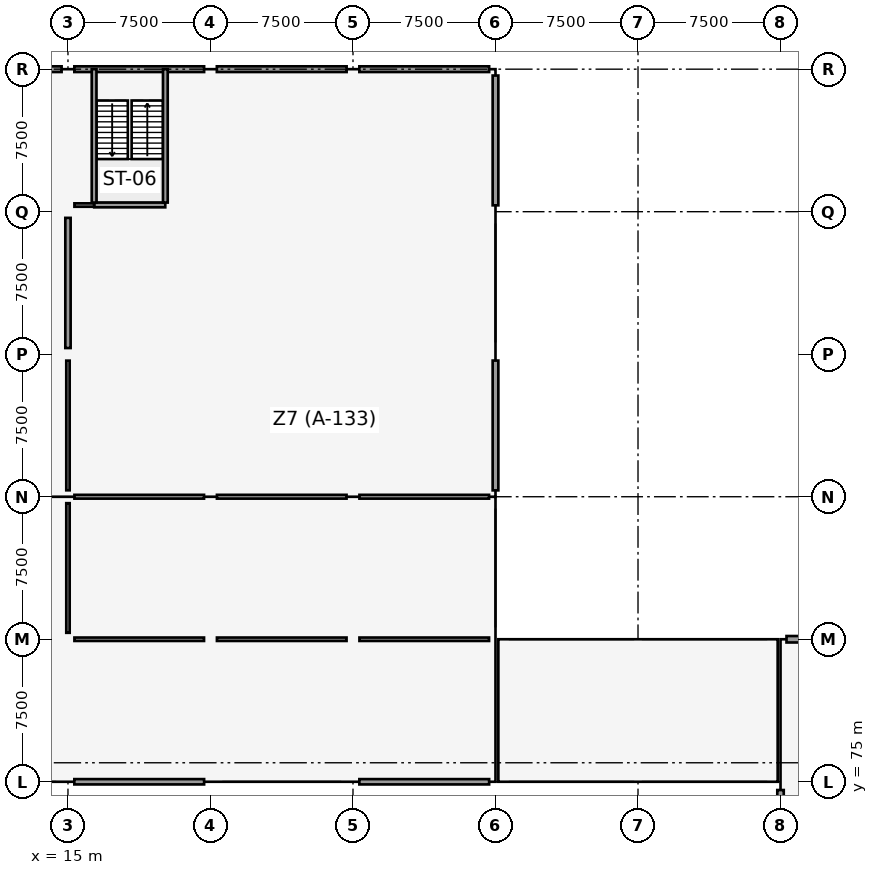
"""IFC4 building model, lengths in metres.
Left out: names, types, materials, properties, quantities, classifications, styles, units other than length and angle.
Written with IfcOpenShell. Run it as: python <this file> out.ifc"""

import sys

from ifc_helpers import new_model, si_unit, direction, frame, frame_2d, origin, origin_2d, place, context, subcontext, project, spatial, rectangle, extrude, element, fill, save


model = new_model("IFC4")
c1 = context("Model", 3, precision=1e-05, world=origin(), true_north=direction((0.0, 1.0)))
c2 = subcontext(c1, "Body", "Model", "MODEL_VIEW")
j1 = project(units=[si_unit("LENGTHUNIT", "METRE"), si_unit("PLANEANGLEUNIT", "RADIAN")], contexts=[c1])
p1 = place(None, origin())
s1 = spatial("IfcSite", under=j1, at=p1, CompositionType="ELEMENT")
p2 = place(p1, origin())
s2 = spatial("IfcBuilding", under=s1, at=p2, CompositionType="ELEMENT")
p3 = place(p2, frame((0.0, 0.0, 4.8)))
s3 = spatial("IfcBuildingStorey", under=s2, at=p3, CompositionType="ELEMENT", Elevation=4.8)
p4 = place(p3, frame((52.5, 75.0, 0.0), z_axis=(0.0, 0.0, 1.0), x_axis=(1.0, 0.0, 0.0)))
e1 = element("IfcColumn", 1, at=p4, inside=s3, PredefinedType="COLUMN", context=c2, shape_type="SweptSolid", body=[
    extrude(rectangle(XDim=0.85, YDim=0.85, at=origin_2d()), origin(), (0.0, 0.0, 1.0), 4.2),
])
p5 = place(p3, frame((52.5, 82.5, 0.0), z_axis=(0.0, 0.0, 1.0), x_axis=(1.0, 0.0, 0.0)))
e2 = element("IfcColumn", 2, at=p5, inside=s3, PredefinedType="COLUMN", context=c2, shape_type="SweptSolid", body=[
    extrude(rectangle(XDim=0.6, YDim=1.1, at=origin_2d()), origin(), (0.0, 0.0, 1.0), 4.2),
])
for number, where, z_axis, x_axis in (
    (3, (15.0, 75.0, 0.0), (0.0, 0.0, 1.0), (1.0, 0.0, 0.0)),
    (4, (15.0, 82.5, 0.0), (0.0, 0.0, 1.0), (1.0, 0.0, 0.0)),
    (5, (15.0, 90.0, 0.0), (0.0, 0.0, 1.0), (1.0, 0.0, 0.0)),
    (6, (15.0, 97.5, 0.0), (0.0, 0.0, 1.0), (1.0, 0.0, 0.0)),
    (7, (15.0, 105.0, 0.0), (0.0, 0.0, 1.0), (1.0, 0.0, 0.0)),
    (8, (15.0, 112.5, 0.0), (0.0, 0.0, 1.0), (1.0, 0.0, 0.0)),
    (9, (22.5, 75.0, 0.0), (0.0, 0.0, 1.0), (1.0, 0.0, 0.0)),
    (10, (22.5, 82.5, 0.0), (0.0, 0.0, 1.0), (1.0, 0.0, 0.0)),
    (11, (22.5, 90.0, 0.0), (0.0, 0.0, 1.0), (1.0, 0.0, 0.0)),
    (12, (22.5, 97.5, 0.0), (0.0, 0.0, 1.0), (1.0, 0.0, 0.0)),
    (13, (22.5, 105.0, 0.0), (0.0, 0.0, 1.0), (1.0, 0.0, 0.0)),
    (14, (22.5, 112.5, 0.0), (0.0, 0.0, 1.0), (1.0, 0.0, 0.0)),
    (15, (30.0, 75.0, 0.0), (0.0, 0.0, 1.0), (1.0, 0.0, 0.0)),
    (16, (30.0, 82.5, 0.0), (0.0, 0.0, 1.0), (1.0, 0.0, 0.0)),
    (17, (30.0, 90.0, 0.0), (0.0, 0.0, 1.0), (1.0, 0.0, 0.0)),
    (18, (30.0, 97.5, 0.0), (0.0, 0.0, 1.0), (1.0, 0.0, 0.0)),
    (19, (30.0, 105.0, 0.0), (0.0, 0.0, 1.0), (1.0, 0.0, 0.0)),
    (20, (30.0, 112.5, 0.0), (0.0, 0.0, 1.0), (1.0, 0.0, 0.0)),
    (21, (37.5, 75.0, 0.0), (0.0, 0.0, 1.0), (1.0, 0.0, 0.0)),
    (22, (37.5, 82.5, 0.0), (0.0, 0.0, 1.0), (1.0, 0.0, 0.0)),
    (23, (37.5, 90.0, 0.0), (0.0, 0.0, 1.0), (1.0, 0.0, 0.0)),
    (24, (37.5, 97.5, 0.0), (0.0, 0.0, 1.0), (1.0, 0.0, 0.0)),
    (25, (37.5, 105.0, 0.0), (0.0, 0.0, 1.0), (1.0, 0.0, 0.0)),
    (26, (37.5, 112.5, 0.0), (0.0, 0.0, 1.0), (1.0, 0.0, 0.0)),
):
    element("IfcColumn", number, at=place(p3, frame(where, z_axis=z_axis, x_axis=x_axis)), inside=s3, PredefinedType="COLUMN", context=c2, shape_type="SweptSolid", body=[
        extrude(rectangle(XDim=0.65, YDim=0.65, at=origin_2d()), origin(), (0.0, 0.0, 1.0), 4.2),
    ])
p6 = place(p3, frame((15.0, 97.825, 0.0), z_axis=(0.0, 0.0, 1.0), x_axis=(0.0, 1.0, 0.0)))
e27 = element("IfcWall", 27, at=p6, inside=s3, PredefinedType="SHEAR", context=c2, shape_type="SweptSolid", body=[
    extrude(rectangle(XDim=6.85, YDim=0.28, at=frame_2d((3.425, 0.0))), origin(), (0.0, 0.0, 1.0), 3.9),
])
p7 = place(p3, frame((52.5, 67.935, 0.0), z_axis=(0.0, 0.0, 1.0), x_axis=(0.0, 1.0, 0.0)))
e28 = element("IfcWall", 28, at=p7, inside=s3, PredefinedType="SOLIDWALL", context=c2, shape_type="SweptSolid", body=[
    extrude(rectangle(XDim=6.63, YDim=0.34, at=frame_2d((3.315, 0.0))), origin(), (0.0, 0.0, 1.0), 2.94),
])
p8 = place(p3, frame((52.815, 82.5, 0.0), z_axis=(0.0, 0.0, 1.0), x_axis=(1.0, 0.0, 0.0)))
e29 = element("IfcWall", 29, at=p8, inside=s3, PredefinedType="SOLIDWALL", context=c2, shape_type="SweptSolid", body=[
    extrude(rectangle(XDim=6.75, YDim=0.34, at=frame_2d((3.375, 0.0))), origin(), (0.0, 0.0, 1.0), 3.14),
])
p9 = place(p8, frame((2.585, 0.0, 0.6)))
e30 = element("IfcOpeningElement", 30, at=p9, cuts=e29, PredefinedType="OPENING", context=c2, shape_type="SweptSolid", body=[
    extrude(rectangle(XDim=1.7, YDim=1.8, at=frame_2d((0.85, 0.9))), frame((0.0, 0.18, 0.0), z_axis=(0.0, -1.0, 0.0), x_axis=(1.0, 0.0, 0.0)), (0.0, 0.0, 1.0), 0.36),
])
p10 = place(p3, frame((8.12, 112.5, 0.0), z_axis=(0.0, 0.0, 1.0), x_axis=(1.0, 0.0, 0.0)))
e31 = element("IfcWall", 31, at=p10, inside=s3, PredefinedType="SOLIDWALL", context=c2, shape_type="SweptSolid", body=[
    extrude(rectangle(XDim=6.545, YDim=0.3, at=frame_2d((3.272, 0.0))), origin(), (0.0, 0.0, 1.0), 2.89),
])
p11 = place(p10, frame((2.355, 0.0, 0.6)))
e32 = element("IfcOpeningElement", 32, at=p11, cuts=e31, PredefinedType="OPENING", context=c2, shape_type="SweptSolid", body=[
    extrude(rectangle(XDim=1.55, YDim=1.8, at=frame_2d((0.775, 0.9))), frame((0.0, 0.16, 0.0), z_axis=(0.0, -1.0, 0.0), x_axis=(1.0, 0.0, 0.0)), (0.0, 0.0, 1.0), 0.32),
])
p12 = place(p3, frame((15.335, 112.5, 0.0), z_axis=(0.0, 0.0, 1.0), x_axis=(1.0, 0.0, 0.0)))
e33 = element("IfcWall", 33, at=p12, inside=s3, PredefinedType="SOLIDWALL", context=c2, shape_type="SweptSolid", body=[
    extrude(rectangle(XDim=6.83, YDim=0.3, at=frame_2d((3.415, 0.0))), origin(), (0.0, 0.0, 1.0), 2.89),
])
p13 = place(p3, frame((15.335, 75.0, 0.0), z_axis=(0.0, 0.0, 1.0), x_axis=(1.0, 0.0, 0.0)))
e34 = element("IfcWall", 34, at=p13, inside=s3, PredefinedType="SOLIDWALL", context=c2, shape_type="SweptSolid", body=[
    extrude(rectangle(XDim=6.83, YDim=0.28, at=frame_2d((3.415, 0.0))), origin(), (0.0, 0.0, 1.0), 2.89),
])
p14 = place(p13, frame((2.415, 0.0, 0.6)))
e35 = element("IfcOpeningElement", 35, at=p14, cuts=e34, PredefinedType="OPENING", context=c2, shape_type="SweptSolid", body=[
    extrude(rectangle(XDim=2.0, YDim=1.45, at=frame_2d((1.0, 0.725))), frame((0.0, 0.15, 0.0), z_axis=(0.0, -1.0, 0.0), x_axis=(1.0, 0.0, 0.0)), (0.0, 0.0, 1.0), 0.3),
])
p15 = place(p3, frame((22.835, 112.5, 0.0), z_axis=(0.0, 0.0, 1.0), x_axis=(1.0, 0.0, 0.0)))
e36 = element("IfcWall", 36, at=p15, inside=s3, PredefinedType="SOLIDWALL", context=c2, shape_type="SweptSolid", body=[
    extrude(rectangle(XDim=6.83, YDim=0.3, at=frame_2d((3.415, 0.0))), origin(), (0.0, 0.0, 1.0), 3.14),
])
p16 = place(p15, frame((2.49, 0.0, 0.6)))
e37 = element("IfcOpeningElement", 37, at=p16, cuts=e36, PredefinedType="OPENING", context=c2, shape_type="SweptSolid", body=[
    extrude(rectangle(XDim=1.85, YDim=1.8, at=frame_2d((0.925, 0.9))), frame((0.0, 0.16, 0.0), z_axis=(0.0, -1.0, 0.0), x_axis=(1.0, 0.0, 0.0)), (0.0, 0.0, 1.0), 0.32),
])
p17 = place(p3, frame((30.335, 112.5, 0.0), z_axis=(0.0, 0.0, 1.0), x_axis=(1.0, 0.0, 0.0)))
e38 = element("IfcWall", 38, at=p17, inside=s3, PredefinedType="SOLIDWALL", context=c2, shape_type="SweptSolid", body=[
    extrude(rectangle(XDim=6.83, YDim=0.3, at=frame_2d((3.415, 0.0))), origin(), (0.0, 0.0, 1.0), 3.14),
])
p18 = place(p17, frame((2.415, 0.0, 0.6)))
e39 = element("IfcOpeningElement", 39, at=p18, cuts=e38, PredefinedType="OPENING", context=c2, shape_type="SweptSolid", body=[
    extrude(rectangle(XDim=2.0, YDim=1.45, at=frame_2d((1.0, 0.725))), frame((0.0, 0.16, 0.0), z_axis=(0.0, -1.0, 0.0), x_axis=(1.0, 0.0, 0.0)), (0.0, 0.0, 1.0), 0.32),
])
p19 = place(p3, frame((30.335, 75.0, 0.0), z_axis=(0.0, 0.0, 1.0), x_axis=(1.0, 0.0, 0.0)))
e40 = element("IfcWall", 40, at=p19, inside=s3, PredefinedType="SOLIDWALL", context=c2, shape_type="SweptSolid", body=[
    extrude(rectangle(XDim=6.83, YDim=0.28, at=frame_2d((3.415, 0.0))), origin(), (0.0, 0.0, 1.0), 3.14),
])
p20 = place(p19, frame((2.84, 0.0, 0.6)))
e41 = element("IfcOpeningElement", 41, at=p20, cuts=e40, PredefinedType="OPENING", context=c2, shape_type="SweptSolid", body=[
    extrude(rectangle(XDim=1.15, YDim=1.3, at=frame_2d((0.575, 0.65))), frame((0.0, 0.15, 0.0), z_axis=(0.0, -1.0, 0.0), x_axis=(1.0, 0.0, 0.0)), (0.0, 0.0, 1.0), 0.3),
])
p21 = place(p3, frame((37.5, 90.335, 0.0), z_axis=(0.0, 0.0, 1.0), x_axis=(0.0, 1.0, 0.0)))
e42 = element("IfcWall", 42, at=p21, inside=s3, PredefinedType="SOLIDWALL", context=c2, shape_type="SweptSolid", body=[
    extrude(rectangle(XDim=6.83, YDim=0.3, at=frame_2d((3.415, 0.0))), origin(), (0.0, 0.0, 1.0), 2.84),
])
p22 = place(p21, frame((2.815, 0.0, 0.6)))
e43 = element("IfcOpeningElement", 43, at=p22, cuts=e42, PredefinedType="OPENING", context=c2, shape_type="SweptSolid", body=[
    extrude(rectangle(XDim=1.2, YDim=1.2, at=frame_2d((0.6, 0.6))), frame((0.0, 0.16, 0.0), z_axis=(0.0, -1.0, 0.0), x_axis=(1.0, 0.0, 0.0)), (0.0, 0.0, 1.0), 0.32),
])
p23 = place(p3, frame((37.5, 105.335, 0.0), z_axis=(0.0, 0.0, 1.0), x_axis=(0.0, 1.0, 0.0)))
e44 = element("IfcWall", 44, at=p23, inside=s3, PredefinedType="SOLIDWALL", context=c2, shape_type="SweptSolid", body=[
    extrude(rectangle(XDim=6.83, YDim=0.3, at=frame_2d((3.415, 0.0))), origin(), (0.0, 0.0, 1.0), 2.94),
])
p24 = place(p23, frame((2.515, 0.0, 0.6)))
e45 = element("IfcOpeningElement", 45, at=p24, cuts=e44, PredefinedType="OPENING", context=c2, shape_type="SweptSolid", body=[
    extrude(rectangle(XDim=1.8, YDim=1.2, at=frame_2d((0.9, 0.6))), frame((0.0, 0.16, 0.0), z_axis=(0.0, -1.0, 0.0), x_axis=(1.0, 0.0, 0.0)), (0.0, 0.0, 1.0), 0.32),
])
p25 = place(p3, frame((16.38, 105.355, 0.0), z_axis=(0.0, 0.0, 1.0), x_axis=(1.0, 0.0, 0.0)))
e46 = element("IfcWall", 46, at=p25, inside=s3, PredefinedType="SOLIDWALL", context=c2, shape_type="SweptSolid", body=[
    extrude(rectangle(XDim=3.74, YDim=0.25, at=frame_2d((1.87, 0.0))), origin(), (0.0, 0.0, 1.0), 3.92),
])
p26 = place(p3, frame((16.375, 105.48, 0.0), z_axis=(0.0, 0.0, 1.0), x_axis=(0.0, 1.0, 0.0)))
e47 = element("IfcWall", 47, at=p26, inside=s3, PredefinedType="SOLIDWALL", context=c2, shape_type="SweptSolid", body=[
    extrude(rectangle(XDim=7.02, YDim=0.25, at=frame_2d((3.51, 0.0))), origin(), (0.0, 0.0, 1.0), 3.92),
])
p27 = place(p26, frame((5.47, 0.0, 0.0)))
e48 = element("IfcOpeningElement", 48, at=p27, cuts=e47, PredefinedType="OPENING", context=c2, shape_type="SweptSolid", body=[
    extrude(rectangle(XDim=1.1, YDim=2.15, at=frame_2d((0.55, 1.075))), frame((0.0, 0.135, 0.0), z_axis=(0.0, -1.0, 0.0), x_axis=(1.0, 0.0, 0.0)), (0.0, 0.0, 1.0), 0.27),
])
p28 = place(p3, frame((20.125, 105.48, 0.0), z_axis=(0.0, 0.0, 1.0), x_axis=(0.0, 1.0, 0.0)))
e49 = element("IfcWall", 49, at=p28, inside=s3, PredefinedType="SOLIDWALL", context=c2, shape_type="SweptSolid", body=[
    extrude(rectangle(XDim=7.02, YDim=0.25, at=frame_2d((3.51, 0.0))), origin(), (0.0, 0.0, 1.0), 3.92),
])
p29 = place(p3, frame((15.339, 105.35, 0.0), z_axis=(0.0, 0.0, 1.0), x_axis=(1.0, 0.0, 0.0)))
e50 = element("IfcWall", 50, at=p29, inside=s3, PredefinedType="PARTITIONING", context=c2, shape_type="SweptSolid", body=[
    extrude(rectangle(XDim=1.041, YDim=0.18, at=frame_2d((0.521, 0.0))), origin(), (0.0, 0.0, 1.0), 2.89),
])
p30 = place(p3, frame((15.339, 82.5, 0.0), z_axis=(0.0, 0.0, 1.0), x_axis=(1.0, 0.0, 0.0)))
e51 = element("IfcWall", 51, at=p30, inside=s3, PredefinedType="PARTITIONING", context=c2, shape_type="SweptSolid", body=[
    extrude(rectangle(XDim=6.822, YDim=0.18, at=frame_2d((3.411, 0.0))), origin(), (0.0, 0.0, 1.0), 2.84),
])
p31 = place(p3, frame((22.839, 82.5, 0.0), z_axis=(0.0, 0.0, 1.0), x_axis=(1.0, 0.0, 0.0)))
e52 = element("IfcWall", 52, at=p31, inside=s3, PredefinedType="PARTITIONING", context=c2, shape_type="SweptSolid", body=[
    extrude(rectangle(XDim=6.822, YDim=0.18, at=frame_2d((3.411, 0.0))), origin(), (0.0, 0.0, 1.0), 2.84),
])
p32 = place(p31, frame((2.886, 0.0, 0.0)))
e53 = element("IfcOpeningElement", 53, at=p32, cuts=e52, PredefinedType="OPENING", context=c2, shape_type="SweptSolid", body=[
    extrude(rectangle(XDim=1.05, YDim=2.12, at=frame_2d((0.525, 1.06))), frame((0.0, 0.1, 0.0), z_axis=(0.0, -1.0, 0.0), x_axis=(1.0, 0.0, 0.0)), (0.0, 0.0, 1.0), 0.2),
])
p33 = place(p3, frame((30.339, 82.5, 0.0), z_axis=(0.0, 0.0, 1.0), x_axis=(1.0, 0.0, 0.0)))
e54 = element("IfcWall", 54, at=p33, inside=s3, PredefinedType="PARTITIONING", context=c2, shape_type="SweptSolid", body=[
    extrude(rectangle(XDim=6.822, YDim=0.18, at=frame_2d((3.411, 0.0))), origin(), (0.0, 0.0, 1.0), 3.04),
])
p34 = place(p3, frame((15.339, 90.0, 0.0), z_axis=(0.0, 0.0, 1.0), x_axis=(1.0, 0.0, 0.0)))
e55 = element("IfcWall", 55, at=p34, inside=s3, PredefinedType="PARTITIONING", context=c2, shape_type="SweptSolid", body=[
    extrude(rectangle(XDim=6.822, YDim=0.2, at=frame_2d((3.411, 0.0))), origin(), (0.0, 0.0, 1.0), 2.89),
])
p35 = place(p3, frame((22.839, 90.0, 0.0), z_axis=(0.0, 0.0, 1.0), x_axis=(1.0, 0.0, 0.0)))
e56 = element("IfcWall", 56, at=p35, inside=s3, PredefinedType="PARTITIONING", context=c2, shape_type="SweptSolid", body=[
    extrude(rectangle(XDim=6.822, YDim=0.2, at=frame_2d((3.411, 0.0))), origin(), (0.0, 0.0, 1.0), 2.94),
])
p36 = place(p3, frame((30.339, 90.0, 0.0), z_axis=(0.0, 0.0, 1.0), x_axis=(1.0, 0.0, 0.0)))
e57 = element("IfcWall", 57, at=p36, inside=s3, PredefinedType="PARTITIONING", context=c2, shape_type="SweptSolid", body=[
    extrude(rectangle(XDim=6.822, YDim=0.2, at=frame_2d((3.411, 0.0))), origin(), (0.0, 0.0, 1.0), 2.99),
])
p37 = place(p3, frame((15.0, 82.839, 0.0), z_axis=(0.0, 0.0, 1.0), x_axis=(0.0, 1.0, 0.0)))
e58 = element("IfcWall", 58, at=p37, inside=s3, PredefinedType="PARTITIONING", context=c2, shape_type="SweptSolid", body=[
    extrude(rectangle(XDim=6.822, YDim=0.18, at=frame_2d((3.411, 0.0))), origin(), (0.0, 0.0, 1.0), 2.84),
])
p38 = place(p37, frame((2.886, 0.0, 0.0)))
e59 = element("IfcOpeningElement", 59, at=p38, cuts=e58, PredefinedType="OPENING", context=c2, shape_type="SweptSolid", body=[
    extrude(rectangle(XDim=1.05, YDim=2.12, at=frame_2d((0.525, 1.06))), frame((0.0, 0.1, 0.0), z_axis=(0.0, -1.0, 0.0), x_axis=(1.0, 0.0, 0.0)), (0.0, 0.0, 1.0), 0.2),
])
p39 = place(p3, frame((15.0, 90.339, 0.0), z_axis=(0.0, 0.0, 1.0), x_axis=(0.0, 1.0, 0.0)))
e60 = element("IfcWall", 60, at=p39, inside=s3, PredefinedType="PARTITIONING", context=c2, shape_type="SweptSolid", body=[
    extrude(rectangle(XDim=6.822, YDim=0.18, at=frame_2d((3.411, 0.0))), origin(), (0.0, 0.0, 1.0), 2.89),
])
p40 = place(p39, frame((2.886, 0.0, 0.0)))
e61 = element("IfcOpeningElement", 61, at=p40, cuts=e60, PredefinedType="OPENING", context=c2, shape_type="SweptSolid", body=[
    extrude(rectangle(XDim=1.05, YDim=2.12, at=frame_2d((0.525, 1.06))), frame((0.0, 0.1, 0.0), z_axis=(0.0, -1.0, 0.0), x_axis=(1.0, 0.0, 0.0)), (0.0, 0.0, 1.0), 0.2),
])
p41 = place(p14, origin())
e62 = element("IfcWindow", 62, at=p41, inside=s3, PartitioningType="SINGLE_PANEL", PredefinedType="WINDOW", context=c2, shape_type="SweptSolid", body=[
    extrude(rectangle(XDim=2.0, YDim=1.45, at=frame_2d((1.0, 0.725))), frame((0.0, 0.03, 0.0), z_axis=(0.0, -1.0, 0.0), x_axis=(1.0, 0.0, 0.0)), (0.0, 0.0, 1.0), 0.06),
])
fill(e35, e62)
p42 = place(p16, origin())
e63 = element("IfcWindow", 63, at=p42, inside=s3, PartitioningType="SINGLE_PANEL", PredefinedType="WINDOW", context=c2, shape_type="SweptSolid", body=[
    extrude(rectangle(XDim=1.85, YDim=1.8, at=frame_2d((0.925, 0.9))), frame((0.0, 0.03, 0.0), z_axis=(0.0, -1.0, 0.0), x_axis=(1.0, 0.0, 0.0)), (0.0, 0.0, 1.0), 0.06),
])
fill(e37, e63)
p43 = place(p18, origin())
e64 = element("IfcWindow", 64, at=p43, inside=s3, PartitioningType="SINGLE_PANEL", PredefinedType="WINDOW", context=c2, shape_type="SweptSolid", body=[
    extrude(rectangle(XDim=2.0, YDim=1.45, at=frame_2d((1.0, 0.725))), frame((0.0, 0.03, 0.0), z_axis=(0.0, -1.0, 0.0), x_axis=(1.0, 0.0, 0.0)), (0.0, 0.0, 1.0), 0.06),
])
fill(e39, e64)
p44 = place(p20, origin())
e65 = element("IfcWindow", 65, at=p44, inside=s3, PartitioningType="SINGLE_PANEL", PredefinedType="WINDOW", context=c2, shape_type="SweptSolid", body=[
    extrude(rectangle(XDim=1.15, YDim=1.3, at=frame_2d((0.575, 0.65))), frame((0.0, 0.03, 0.0), z_axis=(0.0, -1.0, 0.0), x_axis=(1.0, 0.0, 0.0)), (0.0, 0.0, 1.0), 0.06),
])
fill(e41, e65)
p45 = place(p22, origin())
e66 = element("IfcWindow", 66, at=p45, inside=s3, PartitioningType="SINGLE_PANEL", PredefinedType="WINDOW", context=c2, shape_type="SweptSolid", body=[
    extrude(rectangle(XDim=1.2, YDim=1.2, at=frame_2d((0.6, 0.6))), frame((0.0, 0.03, 0.0), z_axis=(0.0, -1.0, 0.0), x_axis=(1.0, 0.0, 0.0)), (0.0, 0.0, 1.0), 0.06),
])
fill(e43, e66)
p46 = place(p24, origin())
e67 = element("IfcWindow", 67, at=p46, inside=s3, PartitioningType="SINGLE_PANEL", PredefinedType="WINDOW", context=c2, shape_type="SweptSolid", body=[
    extrude(rectangle(XDim=1.8, YDim=1.2, at=frame_2d((0.9, 0.6))), frame((0.0, 0.03, 0.0), z_axis=(0.0, -1.0, 0.0), x_axis=(1.0, 0.0, 0.0)), (0.0, 0.0, 1.0), 0.06),
])
fill(e45, e67)
p47 = place(p27, origin())
e68 = element("IfcDoor", 68, at=p47, inside=s3, OperationType="SINGLE_SWING_RIGHT", PredefinedType="DOOR", context=c2, shape_type="SweptSolid", body=[
    extrude(rectangle(XDim=1.1, YDim=2.15, at=frame_2d((0.55, 1.075))), frame((0.0, 0.025, 0.0), z_axis=(0.0, -1.0, 0.0), x_axis=(1.0, 0.0, 0.0)), (0.0, 0.0, 1.0), 0.05),
])
fill(e48, e68)
p48 = place(p32, origin())
e69 = element("IfcDoor", 69, at=p48, inside=s3, OperationType="SINGLE_SWING_RIGHT", PredefinedType="DOOR", context=c2, shape_type="SweptSolid", body=[
    extrude(rectangle(XDim=1.05, YDim=2.12, at=frame_2d((0.525, 1.06))), frame((0.0, 0.025, 0.0), z_axis=(0.0, -1.0, 0.0), x_axis=(1.0, 0.0, 0.0)), (0.0, 0.0, 1.0), 0.05),
])
fill(e53, e69)
p49 = place(p38, origin())
e70 = element("IfcDoor", 70, at=p49, inside=s3, OperationType="SINGLE_SWING_LEFT", PredefinedType="DOOR", context=c2, shape_type="SweptSolid", body=[
    extrude(rectangle(XDim=1.05, YDim=2.12, at=frame_2d((0.525, 1.06))), frame((0.0, 0.025, 0.0), z_axis=(0.0, -1.0, 0.0), x_axis=(1.0, 0.0, 0.0)), (0.0, 0.0, 1.0), 0.05),
])
fill(e59, e70)
p50 = place(p40, origin())
e71 = element("IfcDoor", 71, at=p50, inside=s3, OperationType="SINGLE_SWING_RIGHT", PredefinedType="DOOR", context=c2, shape_type="SweptSolid", body=[
    extrude(rectangle(XDim=1.05, YDim=2.12, at=frame_2d((0.525, 1.06))), frame((0.0, 0.025, 0.0), z_axis=(0.0, -1.0, 0.0), x_axis=(1.0, 0.0, 0.0)), (0.0, 0.0, 1.0), 0.05),
])
fill(e61, e71)
save(model, sys.argv[1])
